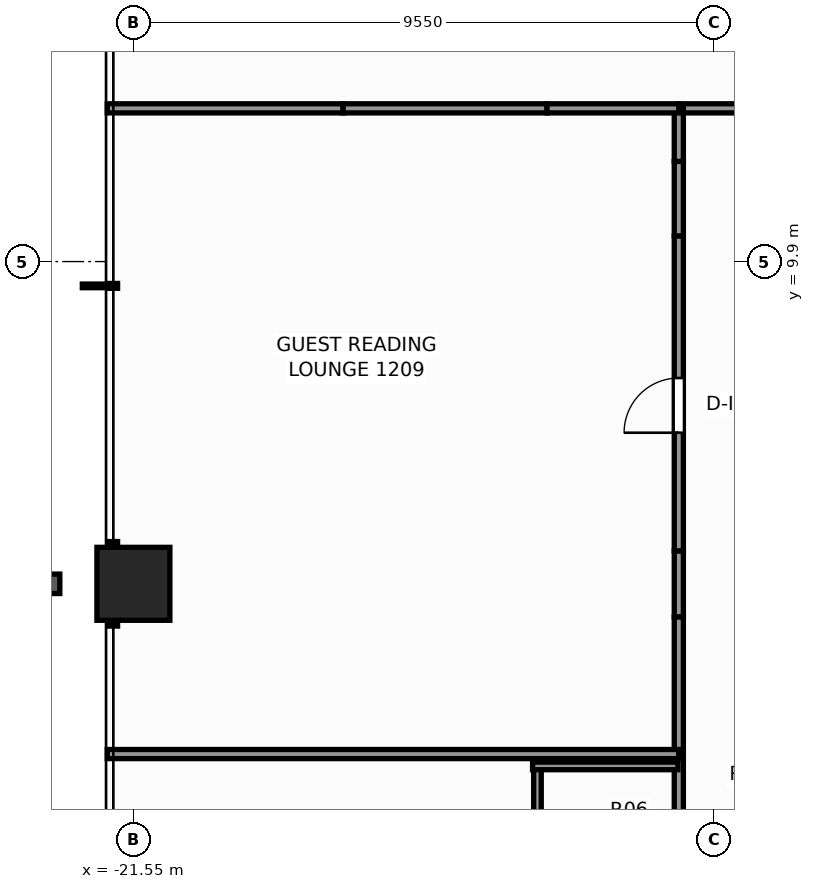
"""IFC4 building model, lengths in metres.
Left out: names, types, materials, properties, quantities, classifications, styles, units other than length and angle.
Written with IfcOpenShell. Run it as: python <this file> out.ifc"""

import sys

from ifc_helpers import new_model, si_unit, direction, frame, frame_2d, origin, origin_2d, place, context, subcontext, project, spatial, rectangle, extrude, element, fill, save


model = new_model("IFC4")
c1 = context("Model", 3, precision=1e-05, world=origin(), true_north=direction((0.0, 1.0)))
c2 = subcontext(c1, "Body", "Model", "MODEL_VIEW")
j1 = project(units=[si_unit("LENGTHUNIT", "METRE"), si_unit("PLANEANGLEUNIT", "RADIAN")], contexts=[c1])
p1 = place(None, origin())
s1 = spatial("IfcSite", under=j1, at=p1, CompositionType="ELEMENT")
p2 = place(p1, origin())
s2 = spatial("IfcBuilding", under=s1, at=p2, CompositionType="ELEMENT")
p3 = place(p2, frame((0.0, 0.0, 43.6)))
s3 = spatial("IfcBuildingStorey", under=s2, at=p3, CompositionType="ELEMENT", Elevation=43.6)
p4 = place(p3, frame((-21.55, 4.6, 0.0), z_axis=(0.0, 0.0, 1.0), x_axis=(1.0, 0.0, 0.0)))
e1 = element("IfcColumn", 1, at=p4, inside=s3, PredefinedType="COLUMN", context=c2, shape_type="SweptSolid", body=[
    extrude(rectangle(XDim=1.2, YDim=1.2, at=origin_2d()), origin(), (0.0, 0.0, 1.0), 3.3),
])
p5 = place(p3, frame((-12.58, 12.42, 0.0), z_axis=(0.0, 0.0, 1.0), x_axis=(1.0, 0.0, 0.0)))
e2 = element("IfcWall", 2, at=p5, inside=s3, PredefinedType="PARTITIONING", context=c2, shape_type="SweptSolid", body=[
    extrude(rectangle(XDim=1.094, YDim=0.15, at=frame_2d((0.547, 0.0))), origin(), (0.0, 0.0, 1.0), 3.06),
])
p6 = place(p3, frame((-12.58, -4.058, 0.0), z_axis=(0.0, 0.0, 1.0), x_axis=(0.0, 1.0, 0.0)))
e3 = element("IfcWall", 3, at=p6, inside=s3, PredefinedType="PARTITIONING", context=c2, shape_type="SweptSolid", body=[
    extrude(rectangle(XDim=8.116, YDim=0.15, at=frame_2d((4.058, 0.0))), origin(), (0.0, 0.0, 1.0), 2.349),
])
p7 = place(p6, frame((0.986, 0.0, 0.0)))
e4 = element("IfcOpeningElement", 4, at=p7, cuts=e3, PredefinedType="OPENING", context=c2, shape_type="SweptSolid", body=[
    extrude(rectangle(XDim=0.95, YDim=2.06, at=frame_2d((0.475, 1.03))), frame((0.0, 0.085, 0.0), z_axis=(0.0, -1.0, 0.0), x_axis=(1.0, 0.0, 0.0)), (0.0, 0.0, 1.0), 0.17),
])
p8 = place(p3, frame((-12.58, 4.058, 0.0), z_axis=(0.0, 0.0, 1.0), x_axis=(0.0, 1.0, 0.0)))
e5 = element("IfcWall", 5, at=p8, inside=s3, PredefinedType="PARTITIONING", context=c2, shape_type="SweptSolid", body=[
    extrude(rectangle(XDim=1.084, YDim=0.15, at=frame_2d((0.542, 0.0))), origin(), (0.0, 0.0, 1.0), 1.545),
])
p9 = place(p3, frame((-12.58, 5.142, 0.0), z_axis=(0.0, 0.0, 1.0), x_axis=(0.0, 1.0, 0.0)))
e6 = element("IfcWall", 6, at=p9, inside=s3, PredefinedType="PARTITIONING", context=c2, shape_type="SweptSolid", body=[
    extrude(rectangle(XDim=5.181, YDim=0.15, at=frame_2d((2.59, 0.0))), origin(), (0.0, 0.0, 1.0), 3.06),
])
p10 = place(p9, frame((1.943, 0.0, 0.0)))
e7 = element("IfcOpeningElement", 7, at=p10, cuts=e6, PredefinedType="OPENING", context=c2, shape_type="SweptSolid", body=[
    extrude(rectangle(XDim=0.9, YDim=2.06, at=frame_2d((0.45, 1.03))), frame((0.0, 0.085, 0.0), z_axis=(0.0, -1.0, 0.0), x_axis=(1.0, 0.0, 0.0)), (0.0, 0.0, 1.0), 0.17),
])
p11 = place(p3, frame((-12.58, 10.323, 0.0), z_axis=(0.0, 0.0, 1.0), x_axis=(0.0, 1.0, 0.0)))
e8 = element("IfcWall", 8, at=p11, inside=s3, PredefinedType="PARTITIONING", context=c2, shape_type="SweptSolid", body=[
    extrude(rectangle(XDim=1.225, YDim=0.15, at=frame_2d((0.612, 0.0))), origin(), (0.0, 0.0, 1.0), 1.545),
])
p12 = place(p3, frame((-12.58, 11.548, 0.0), z_axis=(0.0, 0.0, 1.0), x_axis=(0.0, 1.0, 0.0)))
e9 = element("IfcWall", 9, at=p12, inside=s3, PredefinedType="PARTITIONING", context=c2, shape_type="SweptSolid", body=[
    extrude(rectangle(XDim=0.872, YDim=0.15, at=frame_2d((0.436, 0.0))), origin(), (0.0, 0.0, 1.0), 3.06),
])
p13 = place(p3, frame((-21.98, 12.42, 0.0), z_axis=(0.0, 0.0, 1.0), x_axis=(1.0, 0.0, 0.0)))
e10 = element("IfcWall", 10, at=p13, inside=s3, PredefinedType="PARTITIONING", context=c2, shape_type="SweptSolid", body=[
    extrude(rectangle(XDim=3.88, YDim=0.15, at=frame_2d((1.94, 0.0))), origin(), (0.0, 0.0, 1.0), 2.429),
])
p14 = place(p3, frame((-18.1, 12.42, 0.0), z_axis=(0.0, 0.0, 1.0), x_axis=(1.0, 0.0, 0.0)))
e11 = element("IfcWall", 11, at=p14, inside=s3, PredefinedType="PARTITIONING", context=c2, shape_type="SweptSolid", body=[
    extrude(rectangle(XDim=3.352, YDim=0.15, at=frame_2d((1.676, 0.0))), origin(), (0.0, 0.0, 1.0), 1.545),
])
p15 = place(p3, frame((-14.748, 12.42, 0.0), z_axis=(0.0, 0.0, 1.0), x_axis=(1.0, 0.0, 0.0)))
e12 = element("IfcWall", 12, at=p15, inside=s3, PredefinedType="PARTITIONING", context=c2, shape_type="SweptSolid", body=[
    extrude(rectangle(XDim=2.168, YDim=0.15, at=frame_2d((1.084, 0.0))), origin(), (0.0, 0.0, 1.0), 3.06),
])
p16 = place(p3, frame((-21.98, 1.8, 0.0), z_axis=(0.0, 0.0, 1.0), x_axis=(1.0, 0.0, 0.0)))
e13 = element("IfcWall", 13, at=p16, inside=s3, PredefinedType="PARTITIONING", context=c2, shape_type="SweptSolid", body=[
    extrude(rectangle(XDim=9.4, YDim=0.15, at=frame_2d((4.7, 0.0))), origin(), (0.0, 0.0, 1.0), 2.429),
])
p17 = place(p3, frame((-14.905, -1.105, 0.0), z_axis=(0.0, 0.0, 1.0), x_axis=(0.0, 1.0, 0.0)))
e14 = element("IfcWall", 14, at=p17, inside=s3, PredefinedType="PARTITIONING", context=c2, shape_type="SweptSolid", body=[
    extrude(rectangle(XDim=2.77, YDim=0.125, at=frame_2d((1.385, 0.0))), origin(), (0.0, 0.0, 1.0), 2.585),
])
p18 = place(p3, frame((-14.985, 1.605, 0.0), z_axis=(0.0, 0.0, 1.0), x_axis=(1.0, 0.0, 0.0)))
e15 = element("IfcWall", 15, at=p18, inside=s3, PredefinedType="PARTITIONING", context=c2, shape_type="SweptSolid", body=[
    extrude(rectangle(XDim=2.39, YDim=0.125, at=frame_2d((1.195, 0.0))), origin(), (0.0, 0.0, 1.0), 3.06),
])
p19 = place(p10, origin())
e16 = element("IfcDoor", 16, at=p19, inside=s3, OperationType="SINGLE_SWING_LEFT", PredefinedType="DOOR", context=c2, shape_type="SweptSolid", body=[
    extrude(rectangle(XDim=0.9, YDim=2.06, at=frame_2d((0.45, 1.03))), frame((0.0, 0.025, 0.0), z_axis=(0.0, -1.0, 0.0), x_axis=(1.0, 0.0, 0.0)), (0.0, 0.0, 1.0), 0.05),
])
fill(e7, e16)
save(model, sys.argv[1])
